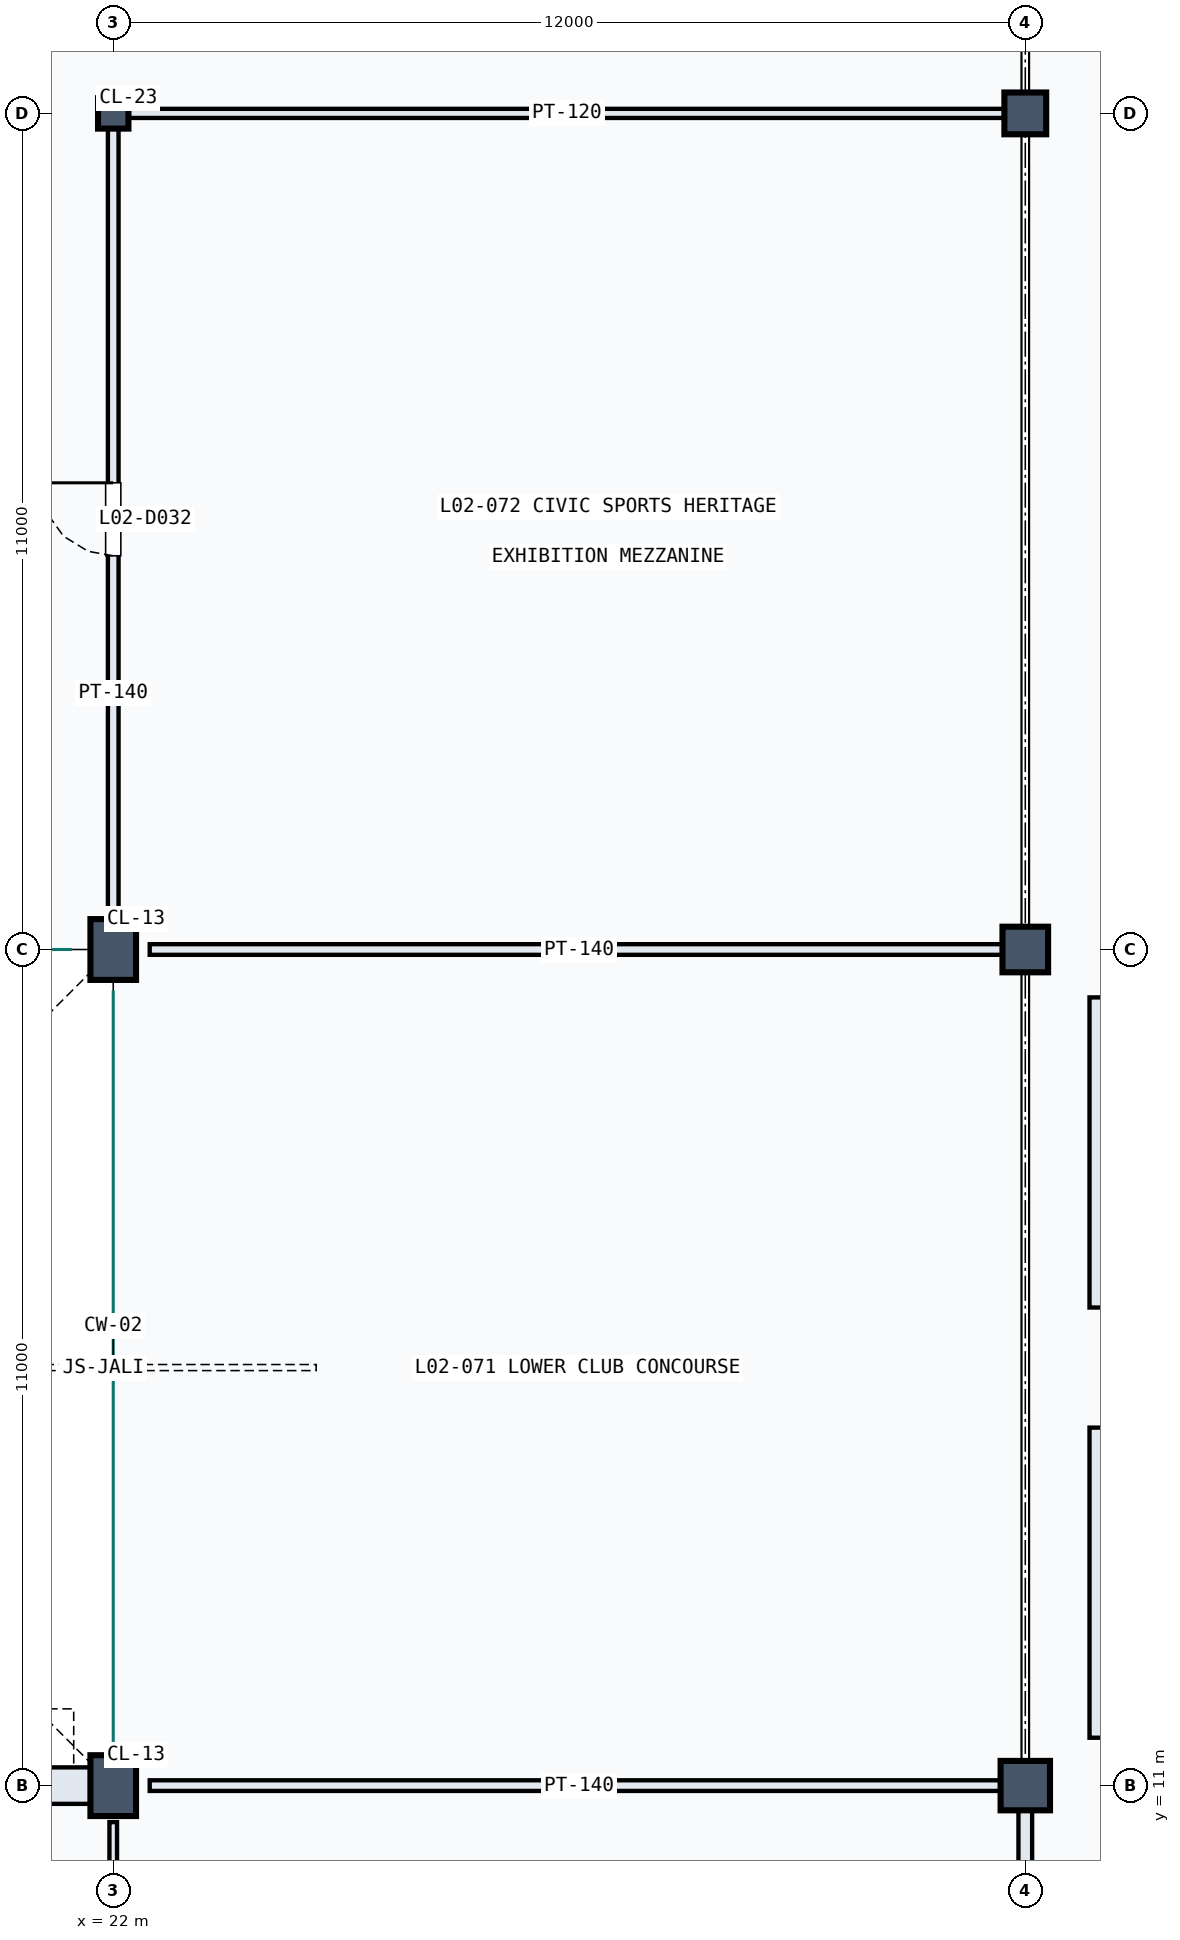
"""IFC4 building model, lengths in metres.
Left out: names, types, materials, properties, quantities, classifications, styles, units other than length and angle.
Written with IfcOpenShell. Run it as: python <this file> out.ifc"""

import sys

from ifc_helpers import new_model, si_unit, direction, frame, frame_2d, origin, origin_2d, place, context, subcontext, project, spatial, rectangle, hollow_rectangle, extrude, element, fill, save


model = new_model("IFC4")
c1 = context("Model", 3, precision=1e-05, world=origin(), true_north=direction((0.0, 1.0)))
c2 = subcontext(c1, "Body", "Model", "MODEL_VIEW")
j1 = project(units=[si_unit("LENGTHUNIT", "METRE"), si_unit("PLANEANGLEUNIT", "RADIAN")], contexts=[c1])
p1 = place(None, origin())
s1 = spatial("IfcSite", under=j1, at=p1, CompositionType="ELEMENT")
p2 = place(p1, origin())
s2 = spatial("IfcBuilding", under=s1, at=p2, CompositionType="ELEMENT")
p3 = place(p2, frame((0.0, 0.0, 10.2)))
s3 = spatial("IfcBuildingStorey", under=s2, at=p3, CompositionType="ELEMENT", Elevation=10.2)
for number, where, z_axis, x_axis in (
    (1, (22.0, 11.0, 0.0), (0.0, 0.0, 1.0), (1.0, 0.0, 0.0)),
    (2, (22.0, 22.0, 0.0), (0.0, 0.0, 1.0), (1.0, 0.0, 0.0)),
):
    element("IfcColumn", number, at=place(p3, frame(where, z_axis=z_axis, x_axis=x_axis)), inside=s3, PredefinedType="COLUMN", context=c2, shape_type="SweptSolid", body=[
        extrude(rectangle(XDim=0.6, YDim=0.8, at=origin_2d()), origin(), (0.0, 0.0, 1.0), 4.5),
    ])
p4 = place(p3, frame((22.0, 33.0, 0.0), z_axis=(0.0, 0.0, 1.0), x_axis=(1.0, 0.0, 0.0)))
e3 = element("IfcColumn", 3, at=p4, inside=s3, PredefinedType="COLUMN", context=c2, shape_type="SweptSolid", body=[
    extrude(hollow_rectangle(XDim=0.4, YDim=0.4, WallThickness=0.02, at=origin_2d()), origin(), (0.0, 0.0, 1.0), 4.5),
])
p5 = place(p3, frame((34.0, 11.0, 0.0), z_axis=(0.0, 0.0, 1.0), x_axis=(1.0, 0.0, 0.0)))
e4 = element("IfcColumn", 4, at=p5, inside=s3, PredefinedType="COLUMN", context=c2, shape_type="SweptSolid", body=[
    extrude(rectangle(XDim=0.65, YDim=0.65, at=origin_2d()), origin(), (0.0, 0.0, 1.0), 4.5),
])
p6 = place(p3, frame((34.0, 22.0, 0.0), z_axis=(0.0, 0.0, 1.0), x_axis=(1.0, 0.0, 0.0)))
e5 = element("IfcColumn", 5, at=p6, inside=s3, PredefinedType="COLUMN", context=c2, shape_type="SweptSolid", body=[
    extrude(rectangle(XDim=0.6, YDim=0.6, at=origin_2d()), origin(), (0.0, 0.0, 1.0), 4.5),
])
p7 = place(p3, frame((34.0, 33.0, 0.0), z_axis=(0.0, 0.0, 1.0), x_axis=(1.0, 0.0, 0.0)))
e6 = element("IfcColumn", 6, at=p7, inside=s3, PredefinedType="COLUMN", context=c2, shape_type="SweptSolid", body=[
    extrude(rectangle(XDim=0.55, YDim=0.55, at=origin_2d()), origin(), (0.0, 0.0, 1.0), 4.5),
])
p8 = place(p3, frame((11.22, 11.0, 0.0), z_axis=(0.0, 0.0, 1.0), x_axis=(1.0, 0.0, 0.0)))
e7 = element("IfcWall", 7, at=p8, inside=s3, PredefinedType="SOLIDWALL", context=c2, shape_type="SweptSolid", body=[
    extrude(rectangle(XDim=10.56, YDim=0.48, at=frame_2d((5.28, 0.0))), origin(), (0.0, 0.0, 1.0), 3.405),
])
p9 = place(p8, frame((2.47, 0.0, 0.9)))
e8 = element("IfcOpeningElement", 8, at=p9, cuts=e7, PredefinedType="OPENING", context=c2, shape_type="SweptSolid", body=[
    extrude(rectangle(XDim=2.1, YDim=1.8, at=frame_2d((1.05, 0.9))), frame((0.0, 0.25, 0.0), z_axis=(0.0, -1.0, 0.0), x_axis=(1.0, 0.0, 0.0)), (0.0, 0.0, 1.0), 0.5),
])
p10 = place(p8, frame((5.99, 0.0, 0.9)))
e9 = element("IfcOpeningElement", 9, at=p10, cuts=e7, PredefinedType="OPENING", context=c2, shape_type="SweptSolid", body=[
    extrude(rectangle(XDim=2.1, YDim=1.8, at=frame_2d((1.05, 0.9))), frame((0.0, 0.25, 0.0), z_axis=(0.0, -1.0, 0.0), x_axis=(1.0, 0.0, 0.0)), (0.0, 0.0, 1.0), 0.5),
])
for number, where, z_axis, x_axis in (
    (10, (34.96, 11.63, 0.0), (0.0, 0.0, 1.0), (0.0, 1.0, 0.0)),
    (11, (34.96, 17.29, 0.0), (0.0, 0.0, 1.0), (0.0, 1.0, 0.0)),
):
    element("IfcWall", number, at=place(p3, frame(where, z_axis=z_axis, x_axis=x_axis)), inside=s3, PredefinedType="SOLIDWALL", context=c2, shape_type="SweptSolid", body=[
        extrude(rectangle(XDim=4.08, YDim=0.23, at=frame_2d((2.04, 0.0))), origin(), (0.0, 0.0, 1.0), 4.14),
    ])
p11 = place(p3, frame((22.0, 2.7, 0.0), z_axis=(0.0, 0.0, 1.0), x_axis=(0.0, 1.0, 0.0)))
e12 = element("IfcWall", 12, at=p11, inside=s3, PredefinedType="PARTITIONING", context=c2, shape_type="SweptSolid", body=[
    extrude(rectangle(XDim=7.82, YDim=0.1, at=frame_2d((3.91, 0.0))), origin(), (0.0, 0.0, 1.0), 4.14),
])
p12 = place(p11, frame((3.39, 0.0, 0.0)))
e13 = element("IfcOpeningElement", 13, at=p12, cuts=e12, PredefinedType="OPENING", context=c2, shape_type="SweptSolid", body=[
    extrude(rectangle(XDim=1.04, YDim=2.15, at=frame_2d((0.52, 1.075))), frame((0.0, 0.06, 0.0), z_axis=(0.0, -1.0, 0.0), x_axis=(1.0, 0.0, 0.0)), (0.0, 0.0, 1.0), 0.12),
])
p13 = place(p3, frame((22.0, 22.48, 0.0), z_axis=(0.0, 0.0, 1.0), x_axis=(0.0, 1.0, 0.0)))
e14 = element("IfcWall", 14, at=p13, inside=s3, PredefinedType="PARTITIONING", context=c2, shape_type="SweptSolid", body=[
    extrude(rectangle(XDim=10.36, YDim=0.14, at=frame_2d((5.18, 0.0))), origin(), (0.0, 0.0, 1.0), 3.405),
])
p14 = place(p13, frame((4.7, 0.0, 0.0)))
e15 = element("IfcOpeningElement", 15, at=p14, cuts=e14, PredefinedType="OPENING", context=c2, shape_type="SweptSolid", body=[
    extrude(rectangle(XDim=0.96, YDim=2.15, at=frame_2d((0.48, 1.075))), frame((0.0, 0.08, 0.0), z_axis=(0.0, -1.0, 0.0), x_axis=(1.0, 0.0, 0.0)), (0.0, 0.0, 1.0), 0.16),
])
for number, where, z_axis, x_axis in (
    (16, (22.48, 11.0, 0.0), (0.0, 0.0, 1.0), (1.0, 0.0, 0.0)),
    (17, (22.48, 22.0, 0.0), (0.0, 0.0, 1.0), (1.0, 0.0, 0.0)),
):
    element("IfcWall", number, at=place(p3, frame(where, z_axis=z_axis, x_axis=x_axis)), inside=s3, PredefinedType="PARTITIONING", context=c2, shape_type="SweptSolid", body=[
        extrude(rectangle(XDim=11.3, YDim=0.14, at=frame_2d((5.65, 0.0))), origin(), (0.0, 0.0, 1.0), 3.405),
    ])
p15 = place(p3, frame((22.16, 33.0, 0.0), z_axis=(0.0, 0.0, 1.0), x_axis=(1.0, 0.0, 0.0)))
e18 = element("IfcWall", 18, at=p15, inside=s3, PredefinedType="PARTITIONING", context=c2, shape_type="SweptSolid", body=[
    extrude(rectangle(XDim=11.62, YDim=0.12, at=frame_2d((5.81, 0.0))), origin(), (0.0, 0.0, 1.0), 3.19),
])
p16 = place(p3, frame((34.0, 0.48, 0.0), z_axis=(0.0, 0.0, 1.0), x_axis=(0.0, 1.0, 0.0)))
e19 = element("IfcWall", 19, at=p16, inside=s3, PredefinedType="PARTITIONING", context=c2, shape_type="SweptSolid", body=[
    extrude(rectangle(XDim=10.3, YDim=0.18, at=frame_2d((5.15, 0.0))), origin(), (0.0, 0.0, 1.0), 3.405),
])
p17 = place(p14, origin())
e20 = element("IfcDoor", 20, at=p17, inside=s3, OperationType="SINGLE_SWING_RIGHT", PredefinedType="DOOR", context=c2, shape_type="SweptSolid", body=[
    extrude(rectangle(XDim=0.96, YDim=2.15, at=frame_2d((0.48, 1.075))), frame((0.0, 0.025, 0.0), z_axis=(0.0, -1.0, 0.0), x_axis=(1.0, 0.0, 0.0)), (0.0, 0.0, 1.0), 0.05),
])
fill(e15, e20)
save(model, sys.argv[1])
